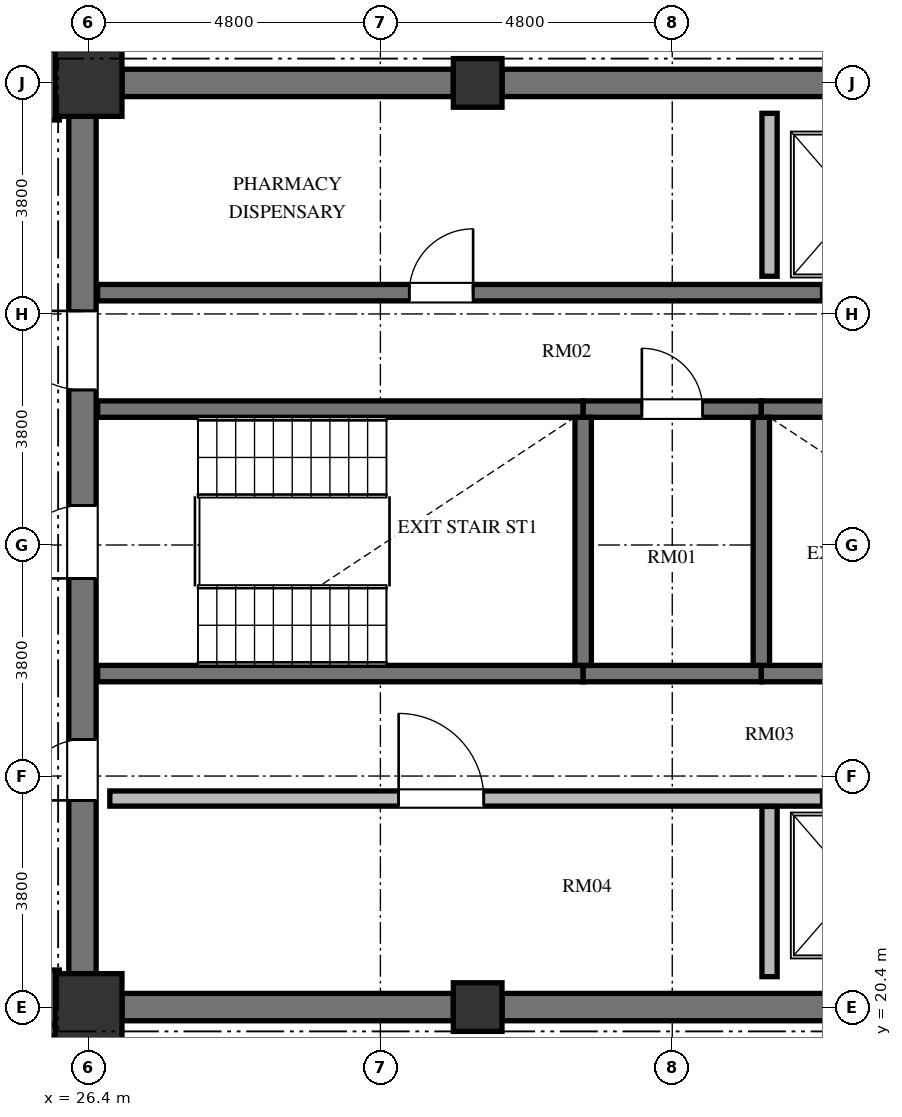
"""IFC4 building model, lengths in metres.
Left out: names, types, materials, properties, quantities, classifications, styles, units other than length and angle.
Written with IfcOpenShell. Run it as: python <this file> out.ifc"""

import sys

from ifc_helpers import new_model, si_unit, direction, frame, frame_2d, origin, origin_2d, place, context, subcontext, project, spatial, rectangle, extrude, element, fill, save


model = new_model("IFC4")
c1 = context("Model", 3, precision=1e-05, world=origin(), true_north=direction((0.0, 1.0)))
c2 = subcontext(c1, "Body", "Model", "MODEL_VIEW")
j1 = project(units=[si_unit("LENGTHUNIT", "METRE"), si_unit("PLANEANGLEUNIT", "RADIAN")], contexts=[c1])
p1 = place(None, origin())
s1 = spatial("IfcSite", under=j1, at=p1, CompositionType="ELEMENT")
p2 = place(p1, origin())
s2 = spatial("IfcBuilding", under=s1, at=p2, CompositionType="ELEMENT")
p3 = place(p2, frame((0.0, 0.0, 265.968)))
s3 = spatial("IfcBuildingStorey", under=s2, at=p3, CompositionType="ELEMENT", Elevation=265.968)
p4 = place(p3, frame((26.4, 20.4, 0.0), z_axis=(0.0, 0.0, 1.0), x_axis=(1.0, 0.0, 0.0)))
e1 = element("IfcColumn", 1, at=p4, inside=s3, PredefinedType="COLUMN", context=c2, shape_type="SweptSolid", body=[
    extrude(rectangle(XDim=1.1, YDim=1.1, at=origin_2d()), origin(), (0.0, 0.0, 1.0), 3.648),
])
for number, where, z_axis, x_axis in (
    (2, (32.8, 20.4, 0.0), (0.0, 0.0, 1.0), (1.0, 0.0, 0.0)),
    (3, (32.8, 35.6, 0.0), (0.0, 0.0, 1.0), (1.0, 0.0, 0.0)),
):
    element("IfcColumn", number, at=place(p3, frame(where, z_axis=z_axis, x_axis=x_axis)), inside=s3, PredefinedType="COLUMN", context=c2, shape_type="SweptSolid", body=[
        extrude(rectangle(XDim=0.8, YDim=0.8, at=origin_2d()), origin(), (0.0, 0.0, 1.0), 3.648),
    ])
p5 = place(p3, frame((26.4, 35.6, 0.0), z_axis=(0.0, 0.0, 1.0), x_axis=(1.0, 0.0, 0.0)))
e4 = element("IfcColumn", 4, at=p5, inside=s3, PredefinedType="COLUMN", context=c2, shape_type="SweptSolid", body=[
    extrude(rectangle(XDim=1.1, YDim=1.1, at=origin_2d()), origin(), (0.0, 0.0, 1.0), 3.648),
])
p6 = place(p3, frame((26.3, 20.95, 0.0), z_axis=(0.0, 0.0, 1.0), x_axis=(0.0, 1.0, 0.0)))
e5 = element("IfcWall", 5, at=p6, inside=s3, PredefinedType="SHEAR", context=c2, shape_type="SweptSolid", body=[
    extrude(rectangle(XDim=14.1, YDim=0.45, at=frame_2d((7.05, 0.0))), origin(), (0.0, 0.0, 1.0), 3.648),
])
p7 = place(p6, frame((6.5, 0.0, 0.0)))
e6 = element("IfcOpeningElement", 6, at=p7, cuts=e5, PredefinedType="OPENING", context=c2, shape_type="SweptSolid", body=[
    extrude(rectangle(XDim=1.2, YDim=2.15, at=frame_2d((0.6, 1.075))), frame((0.0, 0.235, 0.0), z_axis=(0.0, -1.0, 0.0), x_axis=(1.0, 0.0, 0.0)), (0.0, 0.0, 1.0), 0.47),
])
p8 = place(p6, frame((9.6, 0.0, 0.0)))
e7 = element("IfcOpeningElement", 7, at=p8, cuts=e5, PredefinedType="OPENING", context=c2, shape_type="SweptSolid", body=[
    extrude(rectangle(XDim=1.3, YDim=2.2, at=frame_2d((0.65, 1.1))), frame((0.0, 0.235, 0.0), z_axis=(0.0, -1.0, 0.0), x_axis=(1.0, 0.0, 0.0)), (0.0, 0.0, 1.0), 0.47),
])
p9 = place(p6, frame((2.85, 0.0, 0.0)))
e8 = element("IfcOpeningElement", 8, at=p9, cuts=e5, PredefinedType="OPENING", context=c2, shape_type="SweptSolid", body=[
    extrude(rectangle(XDim=1.0, YDim=2.04, at=frame_2d((0.5, 1.02))), frame((0.0, 0.235, 0.0), z_axis=(0.0, -1.0, 0.0), x_axis=(1.0, 0.0, 0.0)), (0.0, 0.0, 1.0), 0.47),
])
for number, where, z_axis, x_axis in (
    (9, (26.95, 20.4, 0.0), (0.0, 0.0, 1.0), (1.0, 0.0, 0.0)),
    (10, (26.95, 35.6, 0.0), (0.0, 0.0, 1.0), (1.0, 0.0, 0.0)),
):
    element("IfcWall", number, at=place(p3, frame(where, z_axis=z_axis, x_axis=x_axis)), inside=s3, PredefinedType="SHEAR", context=c2, shape_type="SweptSolid", body=[
        extrude(rectangle(XDim=5.45, YDim=0.45, at=frame_2d((2.725, 0.0))), origin(), (0.0, 0.0, 1.0), 3.648),
    ])
for number, where, z_axis, x_axis in (
    (11, (33.2, 20.4, 0.0), (0.0, 0.0, 1.0), (1.0, 0.0, 0.0)),
    (12, (33.2, 35.6, 0.0), (0.0, 0.0, 1.0), (1.0, 0.0, 0.0)),
):
    element("IfcWall", number, at=place(p3, frame(where, z_axis=z_axis, x_axis=x_axis)), inside=s3, PredefinedType="SHEAR", context=c2, shape_type="SweptSolid", body=[
        extrude(rectangle(XDim=5.6, YDim=0.45, at=frame_2d((2.8, 0.0))), origin(), (0.0, 0.0, 1.0), 3.648),
    ])
p10 = place(p3, frame((26.55, 30.235, 0.0), z_axis=(0.0, 0.0, 1.0), x_axis=(1.0, 0.0, 0.0)))
e13 = element("IfcWall", 13, at=p10, inside=s3, PredefinedType="SHEAR", context=c2, shape_type="SweptSolid", body=[
    extrude(rectangle(XDim=7.985, YDim=0.27, at=frame_2d((3.992, 0.0))), origin(), (0.0, 0.0, 1.0), 3.648),
])
p11 = place(p3, frame((34.535, 30.235, 0.0), z_axis=(0.0, 0.0, 1.0), x_axis=(1.0, 0.0, 0.0)))
e14 = element("IfcWall", 14, at=p11, inside=s3, PredefinedType="SHEAR", context=c2, shape_type="SweptSolid", body=[
    extrude(rectangle(XDim=2.93, YDim=0.27, at=frame_2d((1.465, 0.0))), origin(), (0.0, 0.0, 1.0), 3.648),
])
p12 = place(p11, frame((0.965, 0.0, 0.0)))
e15 = element("IfcOpeningElement", 15, at=p12, cuts=e14, PredefinedType="OPENING", context=c2, shape_type="SweptSolid", body=[
    extrude(rectangle(XDim=1.0, YDim=2.1, at=frame_2d((0.5, 1.05))), frame((0.0, 0.145, 0.0), z_axis=(0.0, -1.0, 0.0), x_axis=(1.0, 0.0, 0.0)), (0.0, 0.0, 1.0), 0.29),
])
p13 = place(p3, frame((37.465, 30.235, 0.0), z_axis=(0.0, 0.0, 1.0), x_axis=(1.0, 0.0, 0.0)))
e16 = element("IfcWall", 16, at=p13, inside=s3, PredefinedType="SHEAR", context=c2, shape_type="SweptSolid", body=[
    extrude(rectangle(XDim=7.985, YDim=0.27, at=frame_2d((3.992, 0.0))), origin(), (0.0, 0.0, 1.0), 3.648),
])
p14 = place(p13, frame((6.455, 0.0, 0.0)))
e17 = element("IfcOpeningElement", 17, at=p14, cuts=e16, PredefinedType="OPENING", context=c2, shape_type="SweptSolid", body=[
    extrude(rectangle(XDim=1.2, YDim=2.15, at=frame_2d((0.6, 1.075))), frame((0.0, 0.145, 0.0), z_axis=(0.0, -1.0, 0.0), x_axis=(1.0, 0.0, 0.0)), (0.0, 0.0, 1.0), 0.29),
])
p15 = place(p3, frame((26.55, 25.885, 0.0), z_axis=(0.0, 0.0, 1.0), x_axis=(1.0, 0.0, 0.0)))
e18 = element("IfcWall", 18, at=p15, inside=s3, PredefinedType="SHEAR", context=c2, shape_type="SweptSolid", body=[
    extrude(rectangle(XDim=7.985, YDim=0.27, at=frame_2d((3.992, 0.0))), origin(), (0.0, 0.0, 1.0), 3.648),
])
p16 = place(p3, frame((34.535, 25.885, 0.0), z_axis=(0.0, 0.0, 1.0), x_axis=(1.0, 0.0, 0.0)))
e19 = element("IfcWall", 19, at=p16, inside=s3, PredefinedType="SHEAR", context=c2, shape_type="SweptSolid", body=[
    extrude(rectangle(XDim=2.93, YDim=0.27, at=frame_2d((1.465, 0.0))), origin(), (0.0, 0.0, 1.0), 3.648),
])
p17 = place(p3, frame((37.465, 25.885, 0.0), z_axis=(0.0, 0.0, 1.0), x_axis=(1.0, 0.0, 0.0)))
e20 = element("IfcWall", 20, at=p17, inside=s3, PredefinedType="SHEAR", context=c2, shape_type="SweptSolid", body=[
    extrude(rectangle(XDim=7.985, YDim=0.27, at=frame_2d((3.992, 0.0))), origin(), (0.0, 0.0, 1.0), 3.648),
])
for number, where, z_axis, x_axis in (
    (21, (34.535, 26.02, 0.0), (0.0, 0.0, 1.0), (0.0, 1.0, 0.0)),
    (22, (37.465, 26.02, 0.0), (0.0, 0.0, 1.0), (0.0, 1.0, 0.0)),
):
    element("IfcWall", number, at=place(p3, frame(where, z_axis=z_axis, x_axis=x_axis)), inside=s3, PredefinedType="SHEAR", context=c2, shape_type="SweptSolid", body=[
        extrude(rectangle(XDim=4.08, YDim=0.27, at=frame_2d((2.04, 0.0))), origin(), (0.0, 0.0, 1.0), 3.648),
    ])
p18 = place(p3, frame((26.55, 32.15, 0.0), z_axis=(0.0, 0.0, 1.0), x_axis=(1.0, 0.0, 0.0)))
e23 = element("IfcWall", 23, at=p18, inside=s3, PredefinedType="SHEAR", context=c2, shape_type="SweptSolid", body=[
    extrude(rectangle(XDim=16.4, YDim=0.27, at=frame_2d((8.2, 0.0))), origin(), (0.0, 0.0, 1.0), 3.648),
])
p19 = place(p18, frame((5.125, 0.0, 0.0)))
e24 = element("IfcOpeningElement", 24, at=p19, cuts=e23, PredefinedType="OPENING", context=c2, shape_type="SweptSolid", body=[
    extrude(rectangle(XDim=1.05, YDim=2.15, at=frame_2d((0.525, 1.075))), frame((0.0, 0.145, 0.0), z_axis=(0.0, -1.0, 0.0), x_axis=(1.0, 0.0, 0.0)), (0.0, 0.0, 1.0), 0.29),
])
p20 = place(p18, frame((11.9, 0.0, 0.0)))
e25 = element("IfcOpeningElement", 25, at=p20, cuts=e23, PredefinedType="OPENING", context=c2, shape_type="SweptSolid", body=[
    extrude(rectangle(XDim=1.1, YDim=2.2, at=frame_2d((0.55, 1.1))), frame((0.0, 0.145, 0.0), z_axis=(0.0, -1.0, 0.0), x_axis=(1.0, 0.0, 0.0)), (0.0, 0.0, 1.0), 0.29),
])
p21 = place(p18, frame((14.5, 0.0, 0.0)))
e26 = element("IfcOpeningElement", 26, at=p21, cuts=e23, PredefinedType="OPENING", context=c2, shape_type="SweptSolid", body=[
    extrude(rectangle(XDim=1.1, YDim=2.2, at=frame_2d((0.55, 1.1))), frame((0.0, 0.145, 0.0), z_axis=(0.0, -1.0, 0.0), x_axis=(1.0, 0.0, 0.0)), (0.0, 0.0, 1.0), 0.29),
])
p22 = place(p3, frame((26.75, 23.83, 0.0), z_axis=(0.0, 0.0, 1.0), x_axis=(1.0, 0.0, 0.0)))
e27 = element("IfcWall", 27, at=p22, inside=s3, PredefinedType="SOLIDWALL", context=c2, shape_type="SweptSolid", body=[
    extrude(rectangle(XDim=16.2, YDim=0.25, at=frame_2d((8.1, 0.0))), origin(), (0.0, 0.0, 1.0), 3.198),
])
p23 = place(p22, frame((4.75, 0.0, 0.0)))
e28 = element("IfcOpeningElement", 28, at=p23, cuts=e27, PredefinedType="OPENING", context=c2, shape_type="SweptSolid", body=[
    extrude(rectangle(XDim=1.4, YDim=2.2, at=frame_2d((0.7, 1.1))), frame((0.0, 0.135, 0.0), z_axis=(0.0, -1.0, 0.0), x_axis=(1.0, 0.0, 0.0)), (0.0, 0.0, 1.0), 0.27),
])
p24 = place(p22, frame((11.7, 0.0, 0.0)))
e29 = element("IfcOpeningElement", 29, at=p24, cuts=e27, PredefinedType="OPENING", context=c2, shape_type="SweptSolid", body=[
    extrude(rectangle(XDim=1.1, YDim=2.2, at=frame_2d((0.55, 1.1))), frame((0.0, 0.135, 0.0), z_axis=(0.0, -1.0, 0.0), x_axis=(1.0, 0.0, 0.0)), (0.0, 0.0, 1.0), 0.27),
])
p25 = place(p22, frame((14.15, 0.0, 0.0)))
e30 = element("IfcOpeningElement", 30, at=p25, cuts=e27, PredefinedType="OPENING", context=c2, shape_type="SweptSolid", body=[
    extrude(rectangle(XDim=1.4, YDim=2.3, at=frame_2d((0.7, 1.15))), frame((0.0, 0.135, 0.0), z_axis=(0.0, -1.0, 0.0), x_axis=(1.0, 0.0, 0.0)), (0.0, 0.0, 1.0), 0.27),
])
p26 = place(p3, frame((37.6, 32.42, 0.0), z_axis=(0.0, 0.0, 1.0), x_axis=(0.0, 1.0, 0.0)))
e31 = element("IfcWall", 31, at=p26, inside=s3, PredefinedType="SOLIDWALL", context=c2, shape_type="SweptSolid", body=[
    extrude(rectangle(XDim=2.68, YDim=0.25, at=frame_2d((1.34, 0.0))), origin(), (0.0, 0.0, 1.0), 3.198),
])
p27 = place(p3, frame((37.6, 20.9, 0.0), z_axis=(0.0, 0.0, 1.0), x_axis=(0.0, 1.0, 0.0)))
e32 = element("IfcWall", 32, at=p27, inside=s3, PredefinedType="SOLIDWALL", context=c2, shape_type="SweptSolid", body=[
    extrude(rectangle(XDim=2.8, YDim=0.25, at=frame_2d((1.4, 0.0))), origin(), (0.0, 0.0, 1.0), 3.198),
])
p28 = place(p3, frame((25.83, 36.14, 0.0), z_axis=(0.0, 0.0, 1.0), x_axis=(0.0, -1.0, 0.0)))
e33 = element("IfcWall", 33, at=p28, inside=s3, PredefinedType="PARTITIONING", context=c2, shape_type="SweptSolid", body=[
    extrude(rectangle(XDim=1.15, YDim=0.18, at=frame_2d((0.575, 0.0))), origin(), (0.0, 0.0, 1.0), 3.198),
])
p29 = place(p3, frame((25.83, 21.01, 0.0), z_axis=(0.0, 0.0, 1.0), x_axis=(0.0, -1.0, 0.0)))
e34 = element("IfcWall", 34, at=p29, inside=s3, PredefinedType="PARTITIONING", context=c2, shape_type="SweptSolid", body=[
    extrude(rectangle(XDim=1.03, YDim=0.18, at=frame_2d((0.515, 0.0))), origin(), (0.0, 0.0, 1.0), 3.198),
])
p30 = place(p3, frame((25.87, 20.02, 0.0), z_axis=(0.0, 0.0, 1.0), x_axis=(-1.0, 0.0, 0.0)))
e35 = element("IfcWall", 35, at=p30, inside=s3, PredefinedType="PARTITIONING", context=c2, shape_type="SweptSolid", body=[
    extrude(rectangle(XDim=2.56, YDim=0.18, at=frame_2d((1.28, 0.0))), origin(), (0.0, 0.0, 1.0), 3.198),
])
p31 = place(p7, origin())
e36 = element("IfcDoor", 36, at=p31, inside=s3, OperationType="SINGLE_SWING_LEFT", PredefinedType="DOOR", context=c2, shape_type="SweptSolid", body=[
    extrude(rectangle(XDim=1.2, YDim=2.15, at=frame_2d((0.6, 1.075))), frame((0.0, 0.025, 0.0), z_axis=(0.0, -1.0, 0.0), x_axis=(1.0, 0.0, 0.0)), (0.0, 0.0, 1.0), 0.05),
])
fill(e6, e36)
p32 = place(p12, origin())
e37 = element("IfcDoor", 37, at=p32, inside=s3, OperationType="SINGLE_SWING_LEFT", PredefinedType="DOOR", context=c2, shape_type="SweptSolid", body=[
    extrude(rectangle(XDim=1.0, YDim=2.1, at=frame_2d((0.5, 1.05))), frame((0.0, 0.025, 0.0), z_axis=(0.0, -1.0, 0.0), x_axis=(1.0, 0.0, 0.0)), (0.0, 0.0, 1.0), 0.05),
])
fill(e15, e37)
p33 = place(p8, origin())
e38 = element("IfcDoor", 38, at=p33, inside=s3, OperationType="SINGLE_SWING_RIGHT", PredefinedType="DOOR", context=c2, shape_type="SweptSolid", body=[
    extrude(rectangle(XDim=1.3, YDim=2.2, at=frame_2d((0.65, 1.1))), frame((0.0, 0.025, 0.0), z_axis=(0.0, -1.0, 0.0), x_axis=(1.0, 0.0, 0.0)), (0.0, 0.0, 1.0), 0.05),
])
fill(e7, e38)
p34 = place(p9, origin())
e39 = element("IfcDoor", 39, at=p34, inside=s3, OperationType="SINGLE_SWING_LEFT", PredefinedType="DOOR", context=c2, shape_type="SweptSolid", body=[
    extrude(rectangle(XDim=1.0, YDim=2.04, at=frame_2d((0.5, 1.02))), frame((0.0, 0.025, 0.0), z_axis=(0.0, -1.0, 0.0), x_axis=(1.0, 0.0, 0.0)), (0.0, 0.0, 1.0), 0.05),
])
fill(e8, e39)
p35 = place(p19, origin())
e40 = element("IfcDoor", 40, at=p35, inside=s3, OperationType="SINGLE_SWING_RIGHT", PredefinedType="DOOR", context=c2, shape_type="SweptSolid", body=[
    extrude(rectangle(XDim=1.05, YDim=2.15, at=frame_2d((0.525, 1.075))), frame((0.0, 0.025, 0.0), z_axis=(0.0, -1.0, 0.0), x_axis=(1.0, 0.0, 0.0)), (0.0, 0.0, 1.0), 0.05),
])
fill(e24, e40)
p36 = place(p23, origin())
e41 = element("IfcDoor", 41, at=p36, inside=s3, OperationType="SINGLE_SWING_LEFT", PredefinedType="DOOR", context=c2, shape_type="SweptSolid", body=[
    extrude(rectangle(XDim=1.4, YDim=2.2, at=frame_2d((0.7, 1.1))), frame((0.0, 0.025, 0.0), z_axis=(0.0, -1.0, 0.0), x_axis=(1.0, 0.0, 0.0)), (0.0, 0.0, 1.0), 0.05),
])
fill(e28, e41)
p37 = place(p20, origin())
e42 = element("IfcDoor", 42, at=p37, inside=s3, OperationType="SLIDING_TO_LEFT", PredefinedType="DOOR", context=c2, shape_type="SweptSolid", body=[
    extrude(rectangle(XDim=1.1, YDim=2.2, at=frame_2d((0.55, 1.1))), frame((0.0, 0.025, 0.0), z_axis=(0.0, -1.0, 0.0), x_axis=(1.0, 0.0, 0.0)), (0.0, 0.0, 1.0), 0.05),
])
fill(e25, e42)
p38 = place(p24, origin())
e43 = element("IfcDoor", 43, at=p38, inside=s3, OperationType="SLIDING_TO_LEFT", PredefinedType="DOOR", context=c2, shape_type="SweptSolid", body=[
    extrude(rectangle(XDim=1.1, YDim=2.2, at=frame_2d((0.55, 1.1))), frame((0.0, 0.025, 0.0), z_axis=(0.0, -1.0, 0.0), x_axis=(1.0, 0.0, 0.0)), (0.0, 0.0, 1.0), 0.05),
])
fill(e29, e43)
save(model, sys.argv[1])
